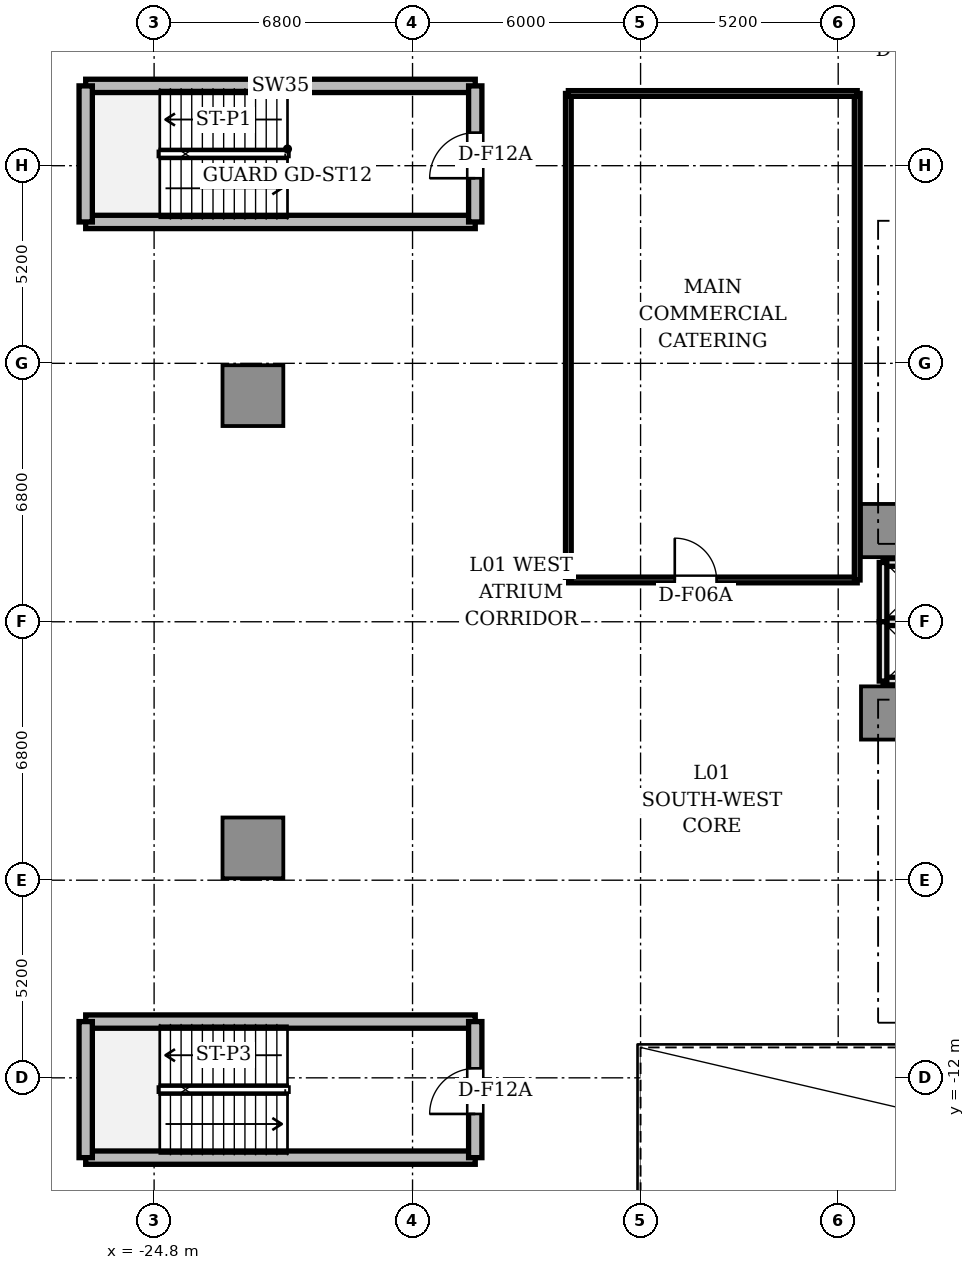
"""IFC4 building model, lengths in metres.
Left out: names, types, materials, properties, quantities, classifications, styles, units other than length and angle.
Written with IfcOpenShell. Run it as: python <this file> out.ifc"""

import sys

from ifc_helpers import new_model, si_unit, direction, frame, frame_2d, origin, origin_2d, place, context, subcontext, project, spatial, rectangle, extrude, source, transform, mapped, element, fill, save


model = new_model("IFC4")
c1 = context("Model", 3, precision=1e-05, world=origin(), true_north=direction((0.0, 1.0)))
c2 = subcontext(c1, "Body", "Model", "MODEL_VIEW")
j1 = project(units=[si_unit("LENGTHUNIT", "METRE"), si_unit("PLANEANGLEUNIT", "RADIAN")], contexts=[c1])
p1 = place(None, origin())
s1 = spatial("IfcSite", under=j1, at=p1, CompositionType="ELEMENT")
p2 = place(p1, origin())
s2 = spatial("IfcBuilding", under=s1, at=p2, CompositionType="ELEMENT")
p3 = place(p2, frame((0.0, 0.0, 4.8)))
s3 = spatial("IfcBuildingStorey", under=s2, at=p3, CompositionType="ELEMENT", Elevation=4.8)
m1 = source(origin(), c2, "Body", "SweptSolid", [
    extrude(rectangle(XDim=1.4, YDim=1.4, at=origin_2d()), origin(), (0.0, 0.0, 1.0), 4.1),
])
for number, where, z_axis, x_axis in (
    (1, (-5.5, 2.4, 0.0), (0.0, 0.0, 1.0), (1.0, 0.0, 0.0)),
    (2, (-5.5, -2.4, 0.0), (0.0, 0.0, 1.0), (1.0, 0.0, 0.0)),
):
    element("IfcColumn", number, at=place(p3, frame(where, z_axis=z_axis, x_axis=x_axis)), inside=s3, PredefinedType="COLUMN", context=c2, shape_type="MappedRepresentation", body=[
        mapped(m1, transform((0.0, 0.0, 0.0), scale=1.0)),
    ])
m2 = source(origin(), c2, "Body", "SweptSolid", [
    extrude(rectangle(XDim=1.6, YDim=1.6, at=origin_2d()), origin(), (0.0, 0.0, 1.0), 4.1),
])
for number, where, z_axis, x_axis in (
    (3, (-22.2, 5.95, 0.0), (0.0, 0.0, 1.0), (1.0, 0.0, 0.0)),
    (4, (-22.2, -5.95, 0.0), (0.0, 0.0, 1.0), (1.0, 0.0, 0.0)),
):
    element("IfcColumn", number, at=place(p3, frame(where, z_axis=z_axis, x_axis=x_axis)), inside=s3, PredefinedType="COLUMN", context=c2, shape_type="MappedRepresentation", body=[
        mapped(m2, transform((0.0, 0.0, 0.0), scale=1.0)),
    ])
for number, where, z_axis, x_axis in (
    (5, (-5.62, 1.56, 0.0), (0.0, 0.0, 1.0), (1.0, 0.0, 0.0)),
    (6, (-5.62, -1.56, 0.0), (0.0, 0.0, 1.0), (1.0, 0.0, 0.0)),
    (7, (-5.62, 0.0, 0.0), (0.0, 0.0, 1.0), (1.0, 0.0, 0.0)),
):
    element("IfcWall", number, at=place(p3, frame(where, z_axis=z_axis, x_axis=x_axis)), inside=s3, PredefinedType="SOLIDWALL", context=c2, shape_type="SweptSolid", body=[
        extrude(rectangle(XDim=1.64, YDim=0.2, at=frame_2d((0.82, 0.0))), origin(), (0.0, 0.0, 1.0), 3.65),
    ])
for number, where, z_axis, x_axis in (
    (8, (-5.62, 0.0, 0.0), (0.0, 0.0, 1.0), (0.0, 1.0, 0.0)),
    (9, (-5.62, -1.56, 0.0), (0.0, 0.0, 1.0), (0.0, 1.0, 0.0)),
):
    element("IfcWall", number, at=place(p3, frame(where, z_axis=z_axis, x_axis=x_axis)), inside=s3, PredefinedType="SOLIDWALL", context=c2, shape_type="SweptSolid", body=[
        extrude(rectangle(XDim=1.56, YDim=0.2, at=frame_2d((0.78, 0.0))), origin(), (0.0, 0.0, 1.0), 3.65),
    ])
for number, where, z_axis, x_axis in (
    (10, (-26.6, 14.1, 0.0), (0.0, 0.0, 1.0), (1.0, 0.0, 0.0)),
    (11, (-26.6, 10.52, 0.0), (0.0, 0.0, 1.0), (1.0, 0.0, 0.0)),
):
    element("IfcWall", number, at=place(p3, frame(where, z_axis=z_axis, x_axis=x_axis)), inside=s3, PredefinedType="SHEAR", context=c2, shape_type="SweptSolid", body=[
        extrude(rectangle(XDim=10.25, YDim=0.35, at=frame_2d((5.125, 0.0))), origin(), (0.0, 0.0, 1.0), 4.1),
    ])
p4 = place(p3, frame((-26.6, 10.52, 0.0), z_axis=(0.0, 0.0, 1.0), x_axis=(0.0, 1.0, 0.0)))
e12 = element("IfcWall", 12, at=p4, inside=s3, PredefinedType="SHEAR", context=c2, shape_type="SweptSolid", body=[
    extrude(rectangle(XDim=3.58, YDim=0.35, at=frame_2d((1.79, 0.0))), origin(), (0.0, 0.0, 1.0), 4.1),
])
p5 = place(p3, frame((-16.35, 10.52, 0.0), z_axis=(0.0, 0.0, 1.0), x_axis=(0.0, 1.0, 0.0)))
e13 = element("IfcWall", 13, at=p5, inside=s3, PredefinedType="SHEAR", context=c2, shape_type="SweptSolid", body=[
    extrude(rectangle(XDim=3.58, YDim=0.35, at=frame_2d((1.79, 0.0))), origin(), (0.0, 0.0, 1.0), 4.1),
])
p6 = place(p5, frame((1.15, 0.0, 0.0)))
e14 = element("IfcOpeningElement", 14, at=p6, cuts=e13, PredefinedType="OPENING", context=c2, shape_type="SweptSolid", body=[
    extrude(rectangle(XDim=1.2, YDim=2.2, at=frame_2d((0.6, 1.1))), frame((0.0, 0.185, 0.0), z_axis=(0.0, -1.0, 0.0), x_axis=(1.0, 0.0, 0.0)), (0.0, 0.0, 1.0), 0.37),
])
for number, where, z_axis, x_axis in (
    (15, (-26.6, -10.52, 0.0), (0.0, 0.0, 1.0), (1.0, 0.0, 0.0)),
    (16, (-26.6, -14.1, 0.0), (0.0, 0.0, 1.0), (1.0, 0.0, 0.0)),
):
    element("IfcWall", number, at=place(p3, frame(where, z_axis=z_axis, x_axis=x_axis)), inside=s3, PredefinedType="SHEAR", context=c2, shape_type="SweptSolid", body=[
        extrude(rectangle(XDim=10.25, YDim=0.35, at=frame_2d((5.125, 0.0))), origin(), (0.0, 0.0, 1.0), 4.1),
    ])
p7 = place(p3, frame((-26.6, -14.1, 0.0), z_axis=(0.0, 0.0, 1.0), x_axis=(0.0, 1.0, 0.0)))
e17 = element("IfcWall", 17, at=p7, inside=s3, PredefinedType="SHEAR", context=c2, shape_type="SweptSolid", body=[
    extrude(rectangle(XDim=3.58, YDim=0.35, at=frame_2d((1.79, 0.0))), origin(), (0.0, 0.0, 1.0), 4.1),
])
p8 = place(p3, frame((-16.35, -14.1, 0.0), z_axis=(0.0, 0.0, 1.0), x_axis=(0.0, 1.0, 0.0)))
e18 = element("IfcWall", 18, at=p8, inside=s3, PredefinedType="SHEAR", context=c2, shape_type="SweptSolid", body=[
    extrude(rectangle(XDim=3.58, YDim=0.35, at=frame_2d((1.79, 0.0))), origin(), (0.0, 0.0, 1.0), 4.1),
])
p9 = place(p8, frame((1.15, 0.0, 0.0)))
e19 = element("IfcOpeningElement", 19, at=p9, cuts=e18, PredefinedType="OPENING", context=c2, shape_type="SweptSolid", body=[
    extrude(rectangle(XDim=1.2, YDim=2.2, at=frame_2d((0.6, 1.1))), frame((0.0, 0.185, 0.0), z_axis=(0.0, -1.0, 0.0), x_axis=(1.0, 0.0, 0.0)), (0.0, 0.0, 1.0), 0.37),
])
p10 = place(p3, frame((-13.9, 1.1, 0.0), z_axis=(0.0, 0.0, 1.0), x_axis=(1.0, 0.0, 0.0)))
e20 = element("IfcWall", 20, at=p10, inside=s3, PredefinedType="PARTITIONING", context=c2, shape_type="SweptSolid", body=[
    extrude(rectangle(XDim=7.6, YDim=0.15, at=frame_2d((3.8, 0.0))), origin(), (0.0, 0.0, 1.0), 3.65),
])
p11 = place(p10, frame((2.8, 0.0, 0.0)))
e21 = element("IfcOpeningElement", 21, at=p11, cuts=e20, PredefinedType="OPENING", context=c2, shape_type="SweptSolid", body=[
    extrude(rectangle(XDim=1.1, YDim=2.15, at=frame_2d((0.55, 1.075))), frame((0.0, 0.085, 0.0), z_axis=(0.0, -1.0, 0.0), x_axis=(1.0, 0.0, 0.0)), (0.0, 0.0, 1.0), 0.17),
])
for number, where, z_axis, x_axis in (
    (22, (-13.9, 1.1, 0.0), (0.0, 0.0, 1.0), (0.0, 1.0, 0.0)),
    (23, (-6.3, 1.1, 0.0), (0.0, 0.0, 1.0), (0.0, 1.0, 0.0)),
):
    element("IfcWall", number, at=place(p3, frame(where, z_axis=z_axis, x_axis=x_axis)), inside=s3, PredefinedType="PARTITIONING", context=c2, shape_type="SweptSolid", body=[
        extrude(rectangle(XDim=12.8, YDim=0.15, at=frame_2d((6.4, 0.0))), origin(), (0.0, 0.0, 1.0), 3.65),
    ])
p12 = place(p3, frame((-13.9, 13.9, 0.0), z_axis=(0.0, 0.0, 1.0), x_axis=(1.0, 0.0, 0.0)))
e24 = element("IfcWall", 24, at=p12, inside=s3, PredefinedType="PARTITIONING", context=c2, shape_type="SweptSolid", body=[
    extrude(rectangle(XDim=7.6, YDim=0.15, at=frame_2d((3.8, 0.0))), origin(), (0.0, 0.0, 1.0), 3.65),
])
m3 = source(origin(), c2, "Body", "SweptSolid", [
    extrude(rectangle(XDim=1.2, YDim=0.05, at=origin_2d()), origin(), (0.0, 0.0, 1.0), 2.2),
])
p13 = place(p6, frame((0.6, 0.0, 0.0)))
e25 = element("IfcDoor", 25, at=p13, inside=s3, OperationType="SINGLE_SWING_LEFT", PredefinedType="DOOR", context=c2, shape_type="MappedRepresentation", body=[
    mapped(m3, transform((0.0, 0.0, 0.0), scale=1.0)),
])
fill(e14, e25)
p14 = place(p9, frame((0.6, 0.0, 0.0)))
e26 = element("IfcDoor", 26, at=p14, inside=s3, OperationType="SINGLE_SWING_LEFT", PredefinedType="DOOR", context=c2, shape_type="MappedRepresentation", body=[
    mapped(m3, transform((0.0, 0.0, 0.0), scale=1.0)),
])
fill(e19, e26)
m4 = source(origin(), c2, "Body", "SweptSolid", [
    extrude(rectangle(XDim=1.1, YDim=0.05, at=origin_2d()), origin(), (0.0, 0.0, 1.0), 2.15),
])
p15 = place(p11, frame((0.55, 0.0, 0.0)))
e27 = element("IfcDoor", 27, at=p15, inside=s3, OperationType="SINGLE_SWING_LEFT", PredefinedType="DOOR", context=c2, shape_type="MappedRepresentation", body=[
    mapped(m4, transform((0.0, 0.0, 0.0), scale=1.0)),
])
fill(e21, e27)
save(model, sys.argv[1])
